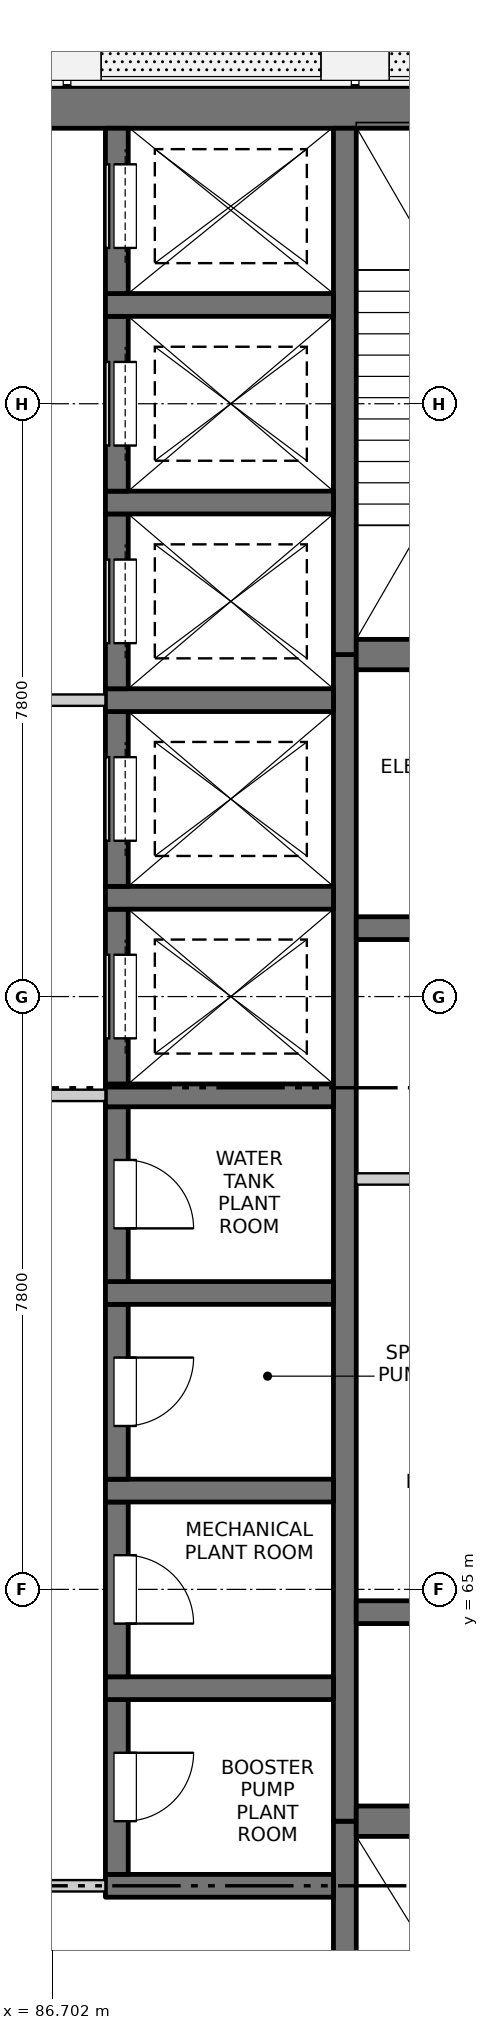
"""IFC4 building model, lengths in metres.
Left out: names, types, materials, properties, quantities, classifications, styles, units other than length and angle.
Written with IfcOpenShell. Run it as: python <this file> out.ifc"""

import sys

from ifc_helpers import new_model, si_unit, direction, frame, frame_2d, origin, place, context, subcontext, project, spatial, rectangle, extrude, element, fill, save


model = new_model("IFC4")
c1 = context("Model", 3, precision=1e-05, world=origin(), true_north=direction((0.0, 1.0)))
c2 = subcontext(c1, "Body", "Model", "MODEL_VIEW")
j1 = project(units=[si_unit("LENGTHUNIT", "METRE"), si_unit("PLANEANGLEUNIT", "RADIAN")], contexts=[c1])
p1 = place(None, origin())
s1 = spatial("IfcSite", under=j1, at=p1, CompositionType="ELEMENT")
p2 = place(p1, origin())
s2 = spatial("IfcBuilding", under=s1, at=p2, CompositionType="ELEMENT")
p3 = place(p2, frame((0.0, 0.0, 144.1)))
s3 = spatial("IfcBuildingStorey", under=s2, at=p3, CompositionType="ELEMENT", Elevation=144.1)
p4 = place(p3, frame((75.525, 84.5, -0.3), z_axis=(0.0, 0.0, 1.0), x_axis=(1.0, 0.0, 0.0)))
e1 = element("IfcWall", 1, at=p4, inside=s3, PredefinedType="SOLIDWALL", context=c2, shape_type="SweptSolid", body=[
    extrude(rectangle(XDim=18.95, YDim=0.55, at=frame_2d((9.475, 0.0))), origin(), (0.0, 0.0, 1.0), 4.5),
])
p5 = place(p3, frame((90.55, 55.525, -0.3), z_axis=(0.0, 0.0, 1.0), x_axis=(0.0, 1.0, 0.0)))
e2 = element("IfcWall", 2, at=p5, inside=s3, PredefinedType="SOLIDWALL", context=c2, shape_type="SweptSolid", body=[
    extrude(rectangle(XDim=6.425, YDim=0.3, at=frame_2d((3.212, 0.0))), origin(), (0.0, 0.0, 1.0), 4.5),
])
p6 = place(p5, frame((0.125, 0.0, 0.3)))
e3 = element("IfcOpeningElement", 3, at=p6, cuts=e2, PredefinedType="OPENING", context=c2, shape_type="SweptSolid", body=[
    extrude(rectangle(XDim=1.2, YDim=2.1, at=frame_2d((0.6, 1.05))), frame((0.0, 0.16, 0.0), z_axis=(0.0, -1.0, 0.0), x_axis=(1.0, 0.0, 0.0)), (0.0, 0.0, 1.0), 0.32),
])
p7 = place(p3, frame((90.55, 61.95, -0.3), z_axis=(0.0, 0.0, 1.0), x_axis=(0.0, 1.0, 0.0)))
e4 = element("IfcWall", 4, at=p7, inside=s3, PredefinedType="SOLIDWALL", context=c2, shape_type="SweptSolid", body=[
    extrude(rectangle(XDim=15.35, YDim=0.3, at=frame_2d((7.675, 0.0))), origin(), (0.0, 0.0, 1.0), 4.5),
])
p8 = place(p3, frame((90.55, 77.3, -0.3), z_axis=(0.0, 0.0, 1.0), x_axis=(0.0, 1.0, 0.0)))
e5 = element("IfcWall", 5, at=p8, inside=s3, PredefinedType="SOLIDWALL", context=c2, shape_type="SweptSolid", body=[
    extrude(rectangle(XDim=6.925, YDim=0.3, at=frame_2d((3.462, 0.0))), origin(), (0.0, 0.0, 1.0), 4.5),
])
p9 = place(p3, frame((87.4, 61.1, -0.3), z_axis=(0.0, 0.0, 1.0), x_axis=(1.0, 0.0, 0.0)))
e6 = element("IfcWall", 6, at=p9, inside=s3, PredefinedType="SOLIDWALL", context=c2, shape_type="SweptSolid", body=[
    extrude(rectangle(XDim=3.0, YDim=0.3, at=frame_2d((1.5, 0.0))), origin(), (0.0, 0.0, 1.0), 4.5),
])
p10 = place(p3, frame((87.55, 61.25, -0.3), z_axis=(0.0, 0.0, 1.0), x_axis=(0.0, 1.0, 0.0)))
e7 = element("IfcWall", 7, at=p10, inside=s3, PredefinedType="SOLIDWALL", context=c2, shape_type="SweptSolid", body=[
    extrude(rectangle(XDim=2.3, YDim=0.3, at=frame_2d((1.15, 0.0))), origin(), (0.0, 0.0, 1.0), 4.5),
])
p11 = place(p10, frame((0.7, 0.0, 0.3)))
e8 = element("IfcOpeningElement", 8, at=p11, cuts=e7, PredefinedType="OPENING", context=c2, shape_type="SweptSolid", body=[
    extrude(rectangle(XDim=0.9, YDim=2.1, at=frame_2d((0.45, 1.05))), frame((0.0, 0.16, 0.0), z_axis=(0.0, -1.0, 0.0), x_axis=(1.0, 0.0, 0.0)), (0.0, 0.0, 1.0), 0.32),
])
p12 = place(p3, frame((87.4, 63.7, -0.3), z_axis=(0.0, 0.0, 1.0), x_axis=(1.0, 0.0, 0.0)))
e9 = element("IfcWall", 9, at=p12, inside=s3, PredefinedType="SOLIDWALL", context=c2, shape_type="SweptSolid", body=[
    extrude(rectangle(XDim=3.0, YDim=0.3, at=frame_2d((1.5, 0.0))), origin(), (0.0, 0.0, 1.0), 4.5),
])
p13 = place(p3, frame((87.55, 63.85, -0.3), z_axis=(0.0, 0.0, 1.0), x_axis=(0.0, 1.0, 0.0)))
e10 = element("IfcWall", 10, at=p13, inside=s3, PredefinedType="SOLIDWALL", context=c2, shape_type="SweptSolid", body=[
    extrude(rectangle(XDim=2.3, YDim=0.3, at=frame_2d((1.15, 0.0))), origin(), (0.0, 0.0, 1.0), 4.5),
])
p14 = place(p13, frame((0.7, 0.0, 0.3)))
e11 = element("IfcOpeningElement", 11, at=p14, cuts=e10, PredefinedType="OPENING", context=c2, shape_type="SweptSolid", body=[
    extrude(rectangle(XDim=0.9, YDim=2.1, at=frame_2d((0.45, 1.05))), frame((0.0, 0.16, 0.0), z_axis=(0.0, -1.0, 0.0), x_axis=(1.0, 0.0, 0.0)), (0.0, 0.0, 1.0), 0.32),
])
p15 = place(p3, frame((87.4, 66.3, -0.3), z_axis=(0.0, 0.0, 1.0), x_axis=(1.0, 0.0, 0.0)))
e12 = element("IfcWall", 12, at=p15, inside=s3, PredefinedType="SOLIDWALL", context=c2, shape_type="SweptSolid", body=[
    extrude(rectangle(XDim=3.0, YDim=0.3, at=frame_2d((1.5, 0.0))), origin(), (0.0, 0.0, 1.0), 4.5),
])
p16 = place(p3, frame((87.55, 66.45, -0.3), z_axis=(0.0, 0.0, 1.0), x_axis=(0.0, 1.0, 0.0)))
e13 = element("IfcWall", 13, at=p16, inside=s3, PredefinedType="SOLIDWALL", context=c2, shape_type="SweptSolid", body=[
    extrude(rectangle(XDim=2.3, YDim=0.3, at=frame_2d((1.15, 0.0))), origin(), (0.0, 0.0, 1.0), 4.5),
])
p17 = place(p16, frame((0.7, 0.0, 0.3)))
e14 = element("IfcOpeningElement", 14, at=p17, cuts=e13, PredefinedType="OPENING", context=c2, shape_type="SweptSolid", body=[
    extrude(rectangle(XDim=0.9, YDim=2.1, at=frame_2d((0.45, 1.05))), frame((0.0, 0.16, 0.0), z_axis=(0.0, -1.0, 0.0), x_axis=(1.0, 0.0, 0.0)), (0.0, 0.0, 1.0), 0.32),
])
p18 = place(p3, frame((87.4, 68.9, -0.3), z_axis=(0.0, 0.0, 1.0), x_axis=(1.0, 0.0, 0.0)))
e15 = element("IfcWall", 15, at=p18, inside=s3, PredefinedType="SOLIDWALL", context=c2, shape_type="SweptSolid", body=[
    extrude(rectangle(XDim=3.0, YDim=0.3, at=frame_2d((1.5, 0.0))), origin(), (0.0, 0.0, 1.0), 4.5),
])
p19 = place(p3, frame((87.55, 69.05, -0.3), z_axis=(0.0, 0.0, 1.0), x_axis=(0.0, 1.0, 0.0)))
e16 = element("IfcWall", 16, at=p19, inside=s3, PredefinedType="SOLIDWALL", context=c2, shape_type="SweptSolid", body=[
    extrude(rectangle(XDim=2.3, YDim=0.3, at=frame_2d((1.15, 0.0))), origin(), (0.0, 0.0, 1.0), 4.5),
])
p20 = place(p19, frame((0.7, 0.0, 0.3)))
e17 = element("IfcOpeningElement", 17, at=p20, cuts=e16, PredefinedType="OPENING", context=c2, shape_type="SweptSolid", body=[
    extrude(rectangle(XDim=0.9, YDim=2.1, at=frame_2d((0.45, 1.05))), frame((0.0, 0.16, 0.0), z_axis=(0.0, -1.0, 0.0), x_axis=(1.0, 0.0, 0.0)), (0.0, 0.0, 1.0), 0.32),
])
p21 = place(p3, frame((87.4, 71.5, -0.3), z_axis=(0.0, 0.0, 1.0), x_axis=(1.0, 0.0, 0.0)))
e18 = element("IfcWall", 18, at=p21, inside=s3, PredefinedType="SOLIDWALL", context=c2, shape_type="SweptSolid", body=[
    extrude(rectangle(XDim=3.0, YDim=0.3, at=frame_2d((1.5, 0.0))), origin(), (0.0, 0.0, 1.0), 4.5),
])
p22 = place(p3, frame((87.55, 71.65, -0.3), z_axis=(0.0, 0.0, 1.0), x_axis=(0.0, 1.0, 0.0)))
e19 = element("IfcWall", 19, at=p22, inside=s3, PredefinedType="SOLIDWALL", context=c2, shape_type="SweptSolid", body=[
    extrude(rectangle(XDim=2.3, YDim=0.3, at=frame_2d((1.15, 0.0))), origin(), (0.0, 0.0, 1.0), 4.5),
])
p23 = place(p22, frame((0.6, 0.0, 0.3)))
e20 = element("IfcOpeningElement", 20, at=p23, cuts=e19, PredefinedType="OPENING", context=c2, shape_type="SweptSolid", body=[
    extrude(rectangle(XDim=1.1, YDim=2.1, at=frame_2d((0.55, 1.05))), frame((0.0, 0.16, 0.0), z_axis=(0.0, -1.0, 0.0), x_axis=(1.0, 0.0, 0.0)), (0.0, 0.0, 1.0), 0.32),
])
p24 = place(p3, frame((87.4, 74.1, -0.3), z_axis=(0.0, 0.0, 1.0), x_axis=(1.0, 0.0, 0.0)))
e21 = element("IfcWall", 21, at=p24, inside=s3, PredefinedType="SOLIDWALL", context=c2, shape_type="SweptSolid", body=[
    extrude(rectangle(XDim=3.0, YDim=0.3, at=frame_2d((1.5, 0.0))), origin(), (0.0, 0.0, 1.0), 4.5),
])
p25 = place(p3, frame((87.55, 74.25, -0.3), z_axis=(0.0, 0.0, 1.0), x_axis=(0.0, 1.0, 0.0)))
e22 = element("IfcWall", 22, at=p25, inside=s3, PredefinedType="SOLIDWALL", context=c2, shape_type="SweptSolid", body=[
    extrude(rectangle(XDim=2.3, YDim=0.3, at=frame_2d((1.15, 0.0))), origin(), (0.0, 0.0, 1.0), 4.5),
])
p26 = place(p25, frame((0.6, 0.0, 0.3)))
e23 = element("IfcOpeningElement", 23, at=p26, cuts=e22, PredefinedType="OPENING", context=c2, shape_type="SweptSolid", body=[
    extrude(rectangle(XDim=1.1, YDim=2.1, at=frame_2d((0.55, 1.05))), frame((0.0, 0.16, 0.0), z_axis=(0.0, -1.0, 0.0), x_axis=(1.0, 0.0, 0.0)), (0.0, 0.0, 1.0), 0.32),
])
p27 = place(p3, frame((87.4, 76.7, -0.3), z_axis=(0.0, 0.0, 1.0), x_axis=(1.0, 0.0, 0.0)))
e24 = element("IfcWall", 24, at=p27, inside=s3, PredefinedType="SOLIDWALL", context=c2, shape_type="SweptSolid", body=[
    extrude(rectangle(XDim=3.0, YDim=0.3, at=frame_2d((1.5, 0.0))), origin(), (0.0, 0.0, 1.0), 4.5),
])
p28 = place(p3, frame((87.55, 76.85, -0.3), z_axis=(0.0, 0.0, 1.0), x_axis=(0.0, 1.0, 0.0)))
e25 = element("IfcWall", 25, at=p28, inside=s3, PredefinedType="SOLIDWALL", context=c2, shape_type="SweptSolid", body=[
    extrude(rectangle(XDim=2.3, YDim=0.3, at=frame_2d((1.15, 0.0))), origin(), (0.0, 0.0, 1.0), 4.5),
])
p29 = place(p28, frame((0.6, 0.0, 0.3)))
e26 = element("IfcOpeningElement", 26, at=p29, cuts=e25, PredefinedType="OPENING", context=c2, shape_type="SweptSolid", body=[
    extrude(rectangle(XDim=1.1, YDim=2.1, at=frame_2d((0.55, 1.05))), frame((0.0, 0.16, 0.0), z_axis=(0.0, -1.0, 0.0), x_axis=(1.0, 0.0, 0.0)), (0.0, 0.0, 1.0), 0.32),
])
p30 = place(p3, frame((87.4, 79.3, -0.3), z_axis=(0.0, 0.0, 1.0), x_axis=(1.0, 0.0, 0.0)))
e27 = element("IfcWall", 27, at=p30, inside=s3, PredefinedType="SOLIDWALL", context=c2, shape_type="SweptSolid", body=[
    extrude(rectangle(XDim=3.0, YDim=0.3, at=frame_2d((1.5, 0.0))), origin(), (0.0, 0.0, 1.0), 4.5),
])
p31 = place(p3, frame((87.55, 79.45, -0.3), z_axis=(0.0, 0.0, 1.0), x_axis=(0.0, 1.0, 0.0)))
e28 = element("IfcWall", 28, at=p31, inside=s3, PredefinedType="SOLIDWALL", context=c2, shape_type="SweptSolid", body=[
    extrude(rectangle(XDim=2.3, YDim=0.3, at=frame_2d((1.15, 0.0))), origin(), (0.0, 0.0, 1.0), 4.5),
])
p32 = place(p31, frame((0.6, 0.0, 0.3)))
e29 = element("IfcOpeningElement", 29, at=p32, cuts=e28, PredefinedType="OPENING", context=c2, shape_type="SweptSolid", body=[
    extrude(rectangle(XDim=1.1, YDim=2.1, at=frame_2d((0.55, 1.05))), frame((0.0, 0.16, 0.0), z_axis=(0.0, -1.0, 0.0), x_axis=(1.0, 0.0, 0.0)), (0.0, 0.0, 1.0), 0.32),
])
p33 = place(p3, frame((87.4, 81.9, -0.3), z_axis=(0.0, 0.0, 1.0), x_axis=(1.0, 0.0, 0.0)))
e30 = element("IfcWall", 30, at=p33, inside=s3, PredefinedType="SOLIDWALL", context=c2, shape_type="SweptSolid", body=[
    extrude(rectangle(XDim=3.0, YDim=0.3, at=frame_2d((1.5, 0.0))), origin(), (0.0, 0.0, 1.0), 4.5),
])
p34 = place(p3, frame((87.55, 82.05, -0.3), z_axis=(0.0, 0.0, 1.0), x_axis=(0.0, 1.0, 0.0)))
e31 = element("IfcWall", 31, at=p34, inside=s3, PredefinedType="SOLIDWALL", context=c2, shape_type="SweptSolid", body=[
    extrude(rectangle(XDim=2.175, YDim=0.3, at=frame_2d((1.087, 0.0))), origin(), (0.0, 0.0, 1.0), 4.5),
])
p35 = place(p34, frame((0.6, 0.0, 0.3)))
e32 = element("IfcOpeningElement", 32, at=p35, cuts=e31, PredefinedType="OPENING", context=c2, shape_type="SweptSolid", body=[
    extrude(rectangle(XDim=1.1, YDim=2.1, at=frame_2d((0.55, 1.05))), frame((0.0, 0.16, 0.0), z_axis=(0.0, -1.0, 0.0), x_axis=(1.0, 0.0, 0.0)), (0.0, 0.0, 1.0), 0.32),
])
p36 = place(p3, frame((90.7, 61.95, -0.3), z_axis=(0.0, 0.0, 1.0), x_axis=(1.0, 0.0, 0.0)))
e33 = element("IfcWall", 33, at=p36, inside=s3, PredefinedType="SOLIDWALL", context=c2, shape_type="SweptSolid", body=[
    extrude(rectangle(XDim=3.775, YDim=0.4, at=frame_2d((1.888, 0.0))), origin(), (0.0, 0.0, 1.0), 4.5),
])
for number, where, z_axis, x_axis in (
    (34, (90.7, 64.7, -0.3), (0.0, 0.0, 1.0), (1.0, 0.0, 0.0)),
    (35, (90.7, 73.7, -0.3), (0.0, 0.0, 1.0), (1.0, 0.0, 0.0)),
):
    element("IfcWall", number, at=place(p3, frame(where, z_axis=z_axis, x_axis=x_axis)), inside=s3, PredefinedType="SOLIDWALL", context=c2, shape_type="SweptSolid", body=[
        extrude(rectangle(XDim=3.775, YDim=0.3, at=frame_2d((1.888, 0.0))), origin(), (0.0, 0.0, 1.0), 4.5),
    ])
p37 = place(p3, frame((90.7, 77.3, -0.3), z_axis=(0.0, 0.0, 1.0), x_axis=(1.0, 0.0, 0.0)))
e36 = element("IfcWall", 36, at=p37, inside=s3, PredefinedType="SOLIDWALL", context=c2, shape_type="SweptSolid", body=[
    extrude(rectangle(XDim=3.775, YDim=0.4, at=frame_2d((1.888, 0.0))), origin(), (0.0, 0.0, 1.0), 4.5),
])
p38 = place(p3, frame((82.6, 61.1, 0.0), z_axis=(0.0, 0.0, 1.0), x_axis=(1.0, 0.0, 0.0)))
e37 = element("IfcWall", 37, at=p38, inside=s3, PredefinedType="PARTITIONING", context=c2, shape_type="SweptSolid", body=[
    extrude(rectangle(XDim=4.8, YDim=0.15, at=frame_2d((2.4, 0.0))), origin(), (0.0, 0.0, 1.0), 4.2),
])
p39 = place(p38, frame((1.5, 0.0, 0.0)))
e38 = element("IfcOpeningElement", 38, at=p39, cuts=e37, PredefinedType="OPENING", context=c2, shape_type="SweptSolid", body=[
    extrude(rectangle(XDim=1.8, YDim=2.1, at=frame_2d((0.9, 1.05))), frame((0.0, 0.085, 0.0), z_axis=(0.0, -1.0, 0.0), x_axis=(1.0, 0.0, 0.0)), (0.0, 0.0, 1.0), 0.17),
])
p40 = place(p3, frame((90.7, 70.4, 0.0), z_axis=(0.0, 0.0, 1.0), x_axis=(1.0, 0.0, 0.0)))
e39 = element("IfcWall", 39, at=p40, inside=s3, PredefinedType="PARTITIONING", context=c2, shape_type="SweptSolid", body=[
    extrude(rectangle(XDim=3.775, YDim=0.15, at=frame_2d((1.887, 0.0))), origin(), (0.0, 0.0, 1.0), 4.2),
])
p41 = place(p3, frame((82.6, 71.5, 0.0), z_axis=(0.0, 0.0, 1.0), x_axis=(1.0, 0.0, 0.0)))
e40 = element("IfcWall", 40, at=p41, inside=s3, PredefinedType="PARTITIONING", context=c2, shape_type="SweptSolid", body=[
    extrude(rectangle(XDim=4.8, YDim=0.15, at=frame_2d((2.4, 0.0))), origin(), (0.0, 0.0, 1.0), 4.2),
])
p42 = place(p41, frame((1.5, 0.0, 0.0)))
e41 = element("IfcOpeningElement", 41, at=p42, cuts=e40, PredefinedType="OPENING", context=c2, shape_type="SweptSolid", body=[
    extrude(rectangle(XDim=1.8, YDim=2.1, at=frame_2d((0.9, 1.05))), frame((0.0, 0.085, 0.0), z_axis=(0.0, -1.0, 0.0), x_axis=(1.0, 0.0, 0.0)), (0.0, 0.0, 1.0), 0.17),
])
p43 = place(p3, frame((82.6, 76.7, 0.0), z_axis=(0.0, 0.0, 1.0), x_axis=(1.0, 0.0, 0.0)))
e42 = element("IfcWall", 42, at=p43, inside=s3, PredefinedType="PARTITIONING", context=c2, shape_type="SweptSolid", body=[
    extrude(rectangle(XDim=4.8, YDim=0.15, at=frame_2d((2.4, 0.0))), origin(), (0.0, 0.0, 1.0), 4.2),
])
p44 = place(p43, frame((1.5, 0.0, 0.0)))
e43 = element("IfcOpeningElement", 43, at=p44, cuts=e42, PredefinedType="OPENING", context=c2, shape_type="SweptSolid", body=[
    extrude(rectangle(XDim=1.8, YDim=2.1, at=frame_2d((0.9, 1.05))), frame((0.0, 0.085, 0.0), z_axis=(0.0, -1.0, 0.0), x_axis=(1.0, 0.0, 0.0)), (0.0, 0.0, 1.0), 0.17),
])
p45 = place(p11, origin())
e44 = element("IfcDoor", 44, at=p45, inside=s3, OperationType="SINGLE_SWING_LEFT", PredefinedType="DOOR", context=c2, shape_type="SweptSolid", body=[
    extrude(rectangle(XDim=0.9, YDim=2.1, at=frame_2d((0.45, 1.05))), frame((0.0, -0.085, 0.0), z_axis=(0.0, -1.0, 0.0), x_axis=(1.0, 0.0, 0.0)), (0.0, 0.0, 1.0), 0.05),
])
fill(e8, e44)
p46 = place(p14, origin())
e45 = element("IfcDoor", 45, at=p46, inside=s3, OperationType="SINGLE_SWING_RIGHT", PredefinedType="DOOR", context=c2, shape_type="SweptSolid", body=[
    extrude(rectangle(XDim=0.9, YDim=2.1, at=frame_2d((0.45, 1.05))), frame((0.0, -0.085, 0.0), z_axis=(0.0, -1.0, 0.0), x_axis=(1.0, 0.0, 0.0)), (0.0, 0.0, 1.0), 0.05),
])
fill(e11, e45)
p47 = place(p17, origin())
e46 = element("IfcDoor", 46, at=p47, inside=s3, OperationType="SINGLE_SWING_LEFT", PredefinedType="DOOR", context=c2, shape_type="SweptSolid", body=[
    extrude(rectangle(XDim=0.9, YDim=2.1, at=frame_2d((0.45, 1.05))), frame((0.0, -0.085, 0.0), z_axis=(0.0, -1.0, 0.0), x_axis=(1.0, 0.0, 0.0)), (0.0, 0.0, 1.0), 0.05),
])
fill(e14, e46)
p48 = place(p20, origin())
e47 = element("IfcDoor", 47, at=p48, inside=s3, OperationType="SINGLE_SWING_RIGHT", PredefinedType="DOOR", context=c2, shape_type="SweptSolid", body=[
    extrude(rectangle(XDim=0.9, YDim=2.1, at=frame_2d((0.45, 1.05))), frame((0.0, -0.085, 0.0), z_axis=(0.0, -1.0, 0.0), x_axis=(1.0, 0.0, 0.0)), (0.0, 0.0, 1.0), 0.05),
])
fill(e17, e47)
p49 = place(p23, origin())
e48 = element("IfcDoor", 48, at=p49, inside=s3, OperationType="SLIDING_TO_LEFT", PredefinedType="DOOR", context=c2, shape_type="SweptSolid", body=[
    extrude(rectangle(XDim=1.1, YDim=2.1, at=frame_2d((0.55, 1.05))), frame((0.0, -0.085, 0.0), z_axis=(0.0, -1.0, 0.0), x_axis=(1.0, 0.0, 0.0)), (0.0, 0.0, 1.0), 0.05),
])
fill(e20, e48)
p50 = place(p26, origin())
e49 = element("IfcDoor", 49, at=p50, inside=s3, OperationType="SLIDING_TO_LEFT", PredefinedType="DOOR", context=c2, shape_type="SweptSolid", body=[
    extrude(rectangle(XDim=1.1, YDim=2.1, at=frame_2d((0.55, 1.05))), frame((0.0, -0.085, 0.0), z_axis=(0.0, -1.0, 0.0), x_axis=(1.0, 0.0, 0.0)), (0.0, 0.0, 1.0), 0.05),
])
fill(e23, e49)
p51 = place(p29, origin())
e50 = element("IfcDoor", 50, at=p51, inside=s3, OperationType="SLIDING_TO_LEFT", PredefinedType="DOOR", context=c2, shape_type="SweptSolid", body=[
    extrude(rectangle(XDim=1.1, YDim=2.1, at=frame_2d((0.55, 1.05))), frame((0.0, -0.085, 0.0), z_axis=(0.0, -1.0, 0.0), x_axis=(1.0, 0.0, 0.0)), (0.0, 0.0, 1.0), 0.05),
])
fill(e26, e50)
p52 = place(p32, origin())
e51 = element("IfcDoor", 51, at=p52, inside=s3, OperationType="SLIDING_TO_RIGHT", PredefinedType="DOOR", context=c2, shape_type="SweptSolid", body=[
    extrude(rectangle(XDim=1.1, YDim=2.1, at=frame_2d((0.55, 1.05))), frame((0.0, -0.085, 0.0), z_axis=(0.0, -1.0, 0.0), x_axis=(1.0, 0.0, 0.0)), (0.0, 0.0, 1.0), 0.05),
])
fill(e29, e51)
p53 = place(p35, origin())
e52 = element("IfcDoor", 52, at=p53, inside=s3, OperationType="SLIDING_TO_RIGHT", PredefinedType="DOOR", context=c2, shape_type="SweptSolid", body=[
    extrude(rectangle(XDim=1.1, YDim=2.1, at=frame_2d((0.55, 1.05))), frame((0.0, -0.085, 0.0), z_axis=(0.0, -1.0, 0.0), x_axis=(1.0, 0.0, 0.0)), (0.0, 0.0, 1.0), 0.05),
])
fill(e32, e52)
save(model, sys.argv[1])
